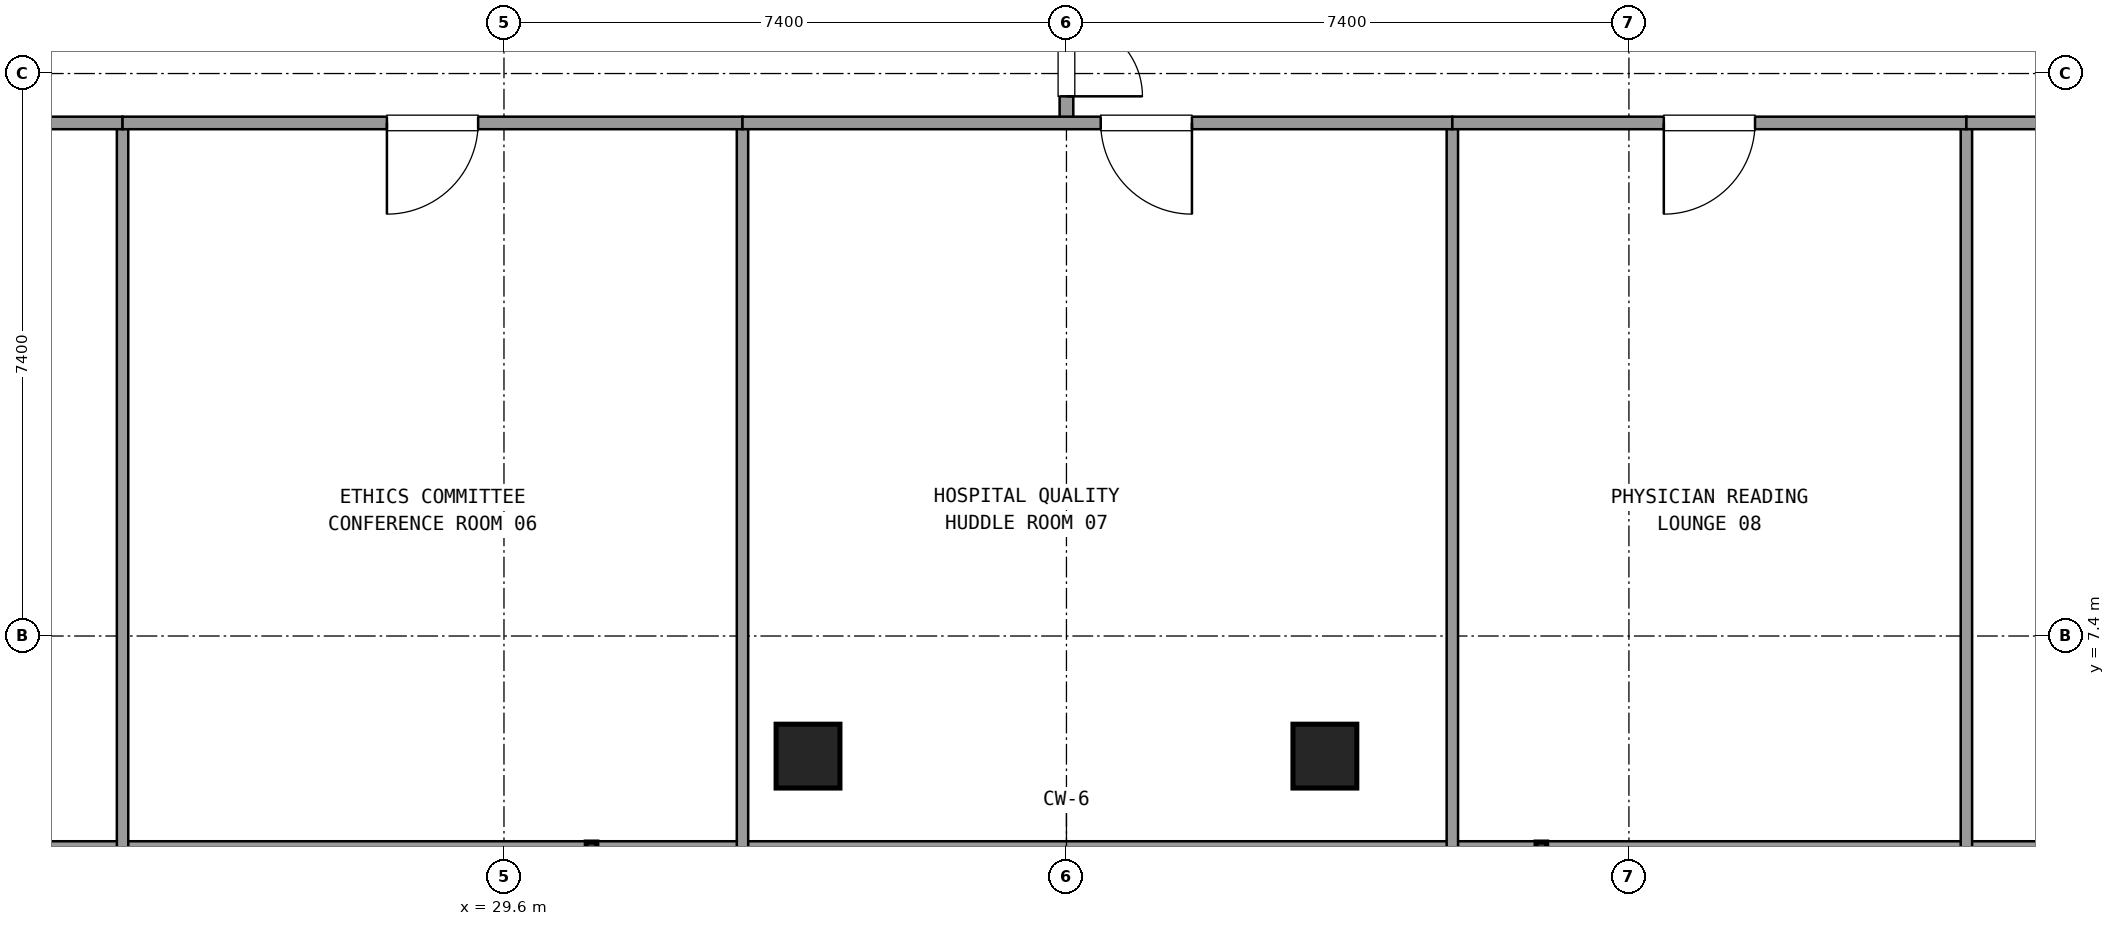
"""IFC4 building model, lengths in metres.
Left out: names, types, materials, properties, quantities, classifications, styles, units other than length and angle.
Written with IfcOpenShell. Run it as: python <this file> out.ifc"""

import sys

from ifc_helpers import new_model, si_unit, direction, frame, frame_2d, origin, origin_2d, place, context, subcontext, project, spatial, rectangle, extrude, element, fill, save


model = new_model("IFC4")
c1 = context("Model", 3, precision=1e-05, world=origin(), true_north=direction((0.0, 1.0)))
c2 = subcontext(c1, "Body", "Model", "MODEL_VIEW")
j1 = project(units=[si_unit("LENGTHUNIT", "METRE"), si_unit("PLANEANGLEUNIT", "RADIAN")], contexts=[c1])
p1 = place(None, origin())
s1 = spatial("IfcSite", under=j1, at=p1, CompositionType="ELEMENT")
p2 = place(p1, origin())
s2 = spatial("IfcBuilding", under=s1, at=p2, CompositionType="ELEMENT")
p3 = place(p2, frame((0.0, 0.0, 275.22)))
s3 = spatial("IfcBuildingStorey", under=s2, at=p3, CompositionType="ELEMENT", Elevation=275.22)
for number, where, z_axis, x_axis in (
    (1, (33.6, 5.82, 0.0), (0.0, 0.0, 1.0), (1.0, 0.0, 0.0)),
    (2, (40.4, 5.82, 0.0), (0.0, 0.0, 1.0), (1.0, 0.0, 0.0)),
):
    element("IfcColumn", number, at=place(p3, frame(where, z_axis=z_axis, x_axis=x_axis)), inside=s3, PredefinedType="COLUMN", context=c2, shape_type="SweptSolid", body=[
        extrude(rectangle(XDim=0.84, YDim=0.84, at=origin_2d()), origin(), (0.0, 0.0, 1.0), 3.6),
    ])
p4 = place(p3, frame((18.255, 4.58, 0.0), z_axis=(0.0, 0.0, 1.0), x_axis=(1.0, 0.0, 0.0)))
e3 = element("IfcWall", 3, at=p4, inside=s3, PredefinedType="SOLIDWALL", context=c2, shape_type="SweptSolid", body=[
    extrude(rectangle(XDim=37.49, YDim=0.24, at=frame_2d((18.745, 0.0))), origin(), (0.0, 0.0, 1.0), 0.85),
])
p5 = place(p3, frame((37.0, 14.15, 0.0), z_axis=(0.0, 0.0, 1.0), x_axis=(0.0, 1.0, 0.0)))
e4 = element("IfcWall", 4, at=p5, inside=s3, PredefinedType="PARTITIONING", context=c2, shape_type="SweptSolid", body=[
    extrude(rectangle(XDim=2.7, YDim=0.18, at=frame_2d((1.35, 0.0))), origin(), (0.0, 0.0, 1.0), 2.61),
])
p6 = place(p5, frame((0.35, 0.0, 0.0)))
e5 = element("IfcOpeningElement", 5, at=p6, cuts=e4, PredefinedType="OPENING", context=c2, shape_type="SweptSolid", body=[
    extrude(rectangle(XDim=2.0, YDim=2.2, at=frame_2d((1.0, 1.1))), frame((0.0, 0.1, 0.0), z_axis=(0.0, -1.0, 0.0), x_axis=(1.0, 0.0, 0.0)), (0.0, 0.0, 1.0), 0.2),
])
p7 = place(p3, frame((24.582, 14.15, 0.0), z_axis=(0.0, 0.0, 1.0), x_axis=(0.0, -1.0, 0.0)))
e6 = element("IfcWall", 6, at=p7, inside=s3, PredefinedType="PARTITIONING", context=c2, shape_type="SweptSolid", body=[
    extrude(rectangle(XDim=9.55, YDim=0.15, at=frame_2d((4.775, 0.0))), origin(), (0.0, 0.0, 1.0), 2.61),
])
p8 = place(p3, frame((21.1, 14.15, 0.0), z_axis=(0.0, 0.0, 1.0), x_axis=(1.0, 0.0, 0.0)))
e7 = element("IfcWall", 7, at=p8, inside=s3, PredefinedType="PARTITIONING", context=c2, shape_type="SweptSolid", body=[
    extrude(rectangle(XDim=3.482, YDim=0.165, at=frame_2d((1.741, 0.0))), origin(), (0.0, 0.0, 1.0), 2.61),
])
p9 = place(p8, frame((1.141, 0.0, 0.0)))
e8 = element("IfcOpeningElement", 8, at=p9, cuts=e7, PredefinedType="OPENING", context=c2, shape_type="SweptSolid", body=[
    extrude(rectangle(XDim=1.2, YDim=2.15, at=frame_2d((0.6, 1.075))), frame((0.0, 0.093, 0.0), z_axis=(0.0, -1.0, 0.0), x_axis=(1.0, 0.0, 0.0)), (0.0, 0.0, 1.0), 0.185),
])
p10 = place(p3, frame((32.738, 14.15, 0.0), z_axis=(0.0, 0.0, 1.0), x_axis=(0.0, -1.0, 0.0)))
e9 = element("IfcWall", 9, at=p10, inside=s3, PredefinedType="PARTITIONING", context=c2, shape_type="SweptSolid", body=[
    extrude(rectangle(XDim=9.55, YDim=0.15, at=frame_2d((4.775, 0.0))), origin(), (0.0, 0.0, 1.0), 2.61),
])
p11 = place(p3, frame((24.582, 14.15, 0.0), z_axis=(0.0, 0.0, 1.0), x_axis=(1.0, 0.0, 0.0)))
e10 = element("IfcWall", 10, at=p11, inside=s3, PredefinedType="PARTITIONING", context=c2, shape_type="SweptSolid", body=[
    extrude(rectangle(XDim=8.156, YDim=0.165, at=frame_2d((4.078, 0.0))), origin(), (0.0, 0.0, 1.0), 2.61),
])
p12 = place(p11, frame((3.478, 0.0, 0.0)))
e11 = element("IfcOpeningElement", 11, at=p12, cuts=e10, PredefinedType="OPENING", context=c2, shape_type="SweptSolid", body=[
    extrude(rectangle(XDim=1.2, YDim=2.15, at=frame_2d((0.6, 1.075))), frame((0.0, 0.093, 0.0), z_axis=(0.0, -1.0, 0.0), x_axis=(1.0, 0.0, 0.0)), (0.0, 0.0, 1.0), 0.185),
])
p13 = place(p3, frame((42.077, 14.15, 0.0), z_axis=(0.0, 0.0, 1.0), x_axis=(0.0, -1.0, 0.0)))
e12 = element("IfcWall", 12, at=p13, inside=s3, PredefinedType="PARTITIONING", context=c2, shape_type="SweptSolid", body=[
    extrude(rectangle(XDim=9.55, YDim=0.15, at=frame_2d((4.775, 0.0))), origin(), (0.0, 0.0, 1.0), 2.61),
])
p14 = place(p3, frame((32.738, 14.15, 0.0), z_axis=(0.0, 0.0, 1.0), x_axis=(1.0, 0.0, 0.0)))
e13 = element("IfcWall", 13, at=p14, inside=s3, PredefinedType="PARTITIONING", context=c2, shape_type="SweptSolid", body=[
    extrude(rectangle(XDim=9.339, YDim=0.165, at=frame_2d((4.669, 0.0))), origin(), (0.0, 0.0, 1.0), 2.61),
])
p15 = place(p14, frame((4.713, 0.0, 0.0)))
e14 = element("IfcOpeningElement", 14, at=p15, cuts=e13, PredefinedType="OPENING", context=c2, shape_type="SweptSolid", body=[
    extrude(rectangle(XDim=1.2, YDim=2.15, at=frame_2d((0.6, 1.075))), frame((0.0, 0.093, 0.0), z_axis=(0.0, -1.0, 0.0), x_axis=(1.0, 0.0, 0.0)), (0.0, 0.0, 1.0), 0.185),
])
p16 = place(p3, frame((48.84, 14.15, 0.0), z_axis=(0.0, 0.0, 1.0), x_axis=(0.0, -1.0, 0.0)))
e15 = element("IfcWall", 15, at=p16, inside=s3, PredefinedType="PARTITIONING", context=c2, shape_type="SweptSolid", body=[
    extrude(rectangle(XDim=9.55, YDim=0.15, at=frame_2d((4.775, 0.0))), origin(), (0.0, 0.0, 1.0), 2.61),
])
p17 = place(p3, frame((42.077, 14.15, 0.0), z_axis=(0.0, 0.0, 1.0), x_axis=(1.0, 0.0, 0.0)))
e16 = element("IfcWall", 16, at=p17, inside=s3, PredefinedType="PARTITIONING", context=c2, shape_type="SweptSolid", body=[
    extrude(rectangle(XDim=6.763, YDim=0.165, at=frame_2d((3.382, 0.0))), origin(), (0.0, 0.0, 1.0), 2.61),
])
p18 = place(p17, frame((2.782, 0.0, 0.0)))
e17 = element("IfcOpeningElement", 17, at=p18, cuts=e16, PredefinedType="OPENING", context=c2, shape_type="SweptSolid", body=[
    extrude(rectangle(XDim=1.2, YDim=2.15, at=frame_2d((0.6, 1.075))), frame((0.0, 0.093, 0.0), z_axis=(0.0, -1.0, 0.0), x_axis=(1.0, 0.0, 0.0)), (0.0, 0.0, 1.0), 0.185),
])
p19 = place(p3, frame((48.84, 14.15, 0.0), z_axis=(0.0, 0.0, 1.0), x_axis=(1.0, 0.0, 0.0)))
e18 = element("IfcWall", 18, at=p19, inside=s3, PredefinedType="PARTITIONING", context=c2, shape_type="SweptSolid", body=[
    extrude(rectangle(XDim=4.06, YDim=0.165, at=frame_2d((2.03, 0.0))), origin(), (0.0, 0.0, 1.0), 2.61),
])
p20 = place(p19, frame((1.43, 0.0, 0.0)))
e19 = element("IfcOpeningElement", 19, at=p20, cuts=e18, PredefinedType="OPENING", context=c2, shape_type="SweptSolid", body=[
    extrude(rectangle(XDim=1.2, YDim=2.15, at=frame_2d((0.6, 1.075))), frame((0.0, 0.093, 0.0), z_axis=(0.0, -1.0, 0.0), x_axis=(1.0, 0.0, 0.0)), (0.0, 0.0, 1.0), 0.185),
])
p21 = place(p6, frame((2.0, 0.0, 0.0), z_axis=(0.0, 0.0, 1.0), x_axis=(-1.0, 0.0, 0.0)))
e20 = element("IfcDoor", 20, at=p21, inside=s3, OperationType="DOUBLE_DOOR_SINGLE_SWING", PredefinedType="DOOR", context=c2, shape_type="SweptSolid", body=[
    extrude(rectangle(XDim=2.0, YDim=2.2, at=frame_2d((1.0, 1.1))), frame((0.0, 0.025, 0.0), z_axis=(0.0, -1.0, 0.0), x_axis=(1.0, 0.0, 0.0)), (0.0, 0.0, 1.0), 0.05),
])
fill(e5, e20)
p22 = place(p12, frame((1.2, 0.0, 0.0), z_axis=(0.0, 0.0, 1.0), x_axis=(-1.0, 0.0, 0.0)))
e21 = element("IfcDoor", 21, at=p22, inside=s3, OperationType="SINGLE_SWING_LEFT", PredefinedType="DOOR", context=c2, shape_type="SweptSolid", body=[
    extrude(rectangle(XDim=1.2, YDim=2.15, at=frame_2d((0.6, 1.075))), frame((0.0, 0.025, 0.0), z_axis=(0.0, -1.0, 0.0), x_axis=(1.0, 0.0, 0.0)), (0.0, 0.0, 1.0), 0.05),
])
fill(e11, e21)
p23 = place(p15, frame((1.2, 0.0, 0.0), z_axis=(0.0, 0.0, 1.0), x_axis=(-1.0, 0.0, 0.0)))
e22 = element("IfcDoor", 22, at=p23, inside=s3, OperationType="SINGLE_SWING_RIGHT", PredefinedType="DOOR", context=c2, shape_type="SweptSolid", body=[
    extrude(rectangle(XDim=1.2, YDim=2.15, at=frame_2d((0.6, 1.075))), frame((0.0, 0.025, 0.0), z_axis=(0.0, -1.0, 0.0), x_axis=(1.0, 0.0, 0.0)), (0.0, 0.0, 1.0), 0.05),
])
fill(e14, e22)
p24 = place(p18, frame((1.2, 0.0, 0.0), z_axis=(0.0, 0.0, 1.0), x_axis=(-1.0, 0.0, 0.0)))
e23 = element("IfcDoor", 23, at=p24, inside=s3, OperationType="SINGLE_SWING_LEFT", PredefinedType="DOOR", context=c2, shape_type="SweptSolid", body=[
    extrude(rectangle(XDim=1.2, YDim=2.15, at=frame_2d((0.6, 1.075))), frame((0.0, 0.025, 0.0), z_axis=(0.0, -1.0, 0.0), x_axis=(1.0, 0.0, 0.0)), (0.0, 0.0, 1.0), 0.05),
])
fill(e17, e23)
save(model, sys.argv[1])
